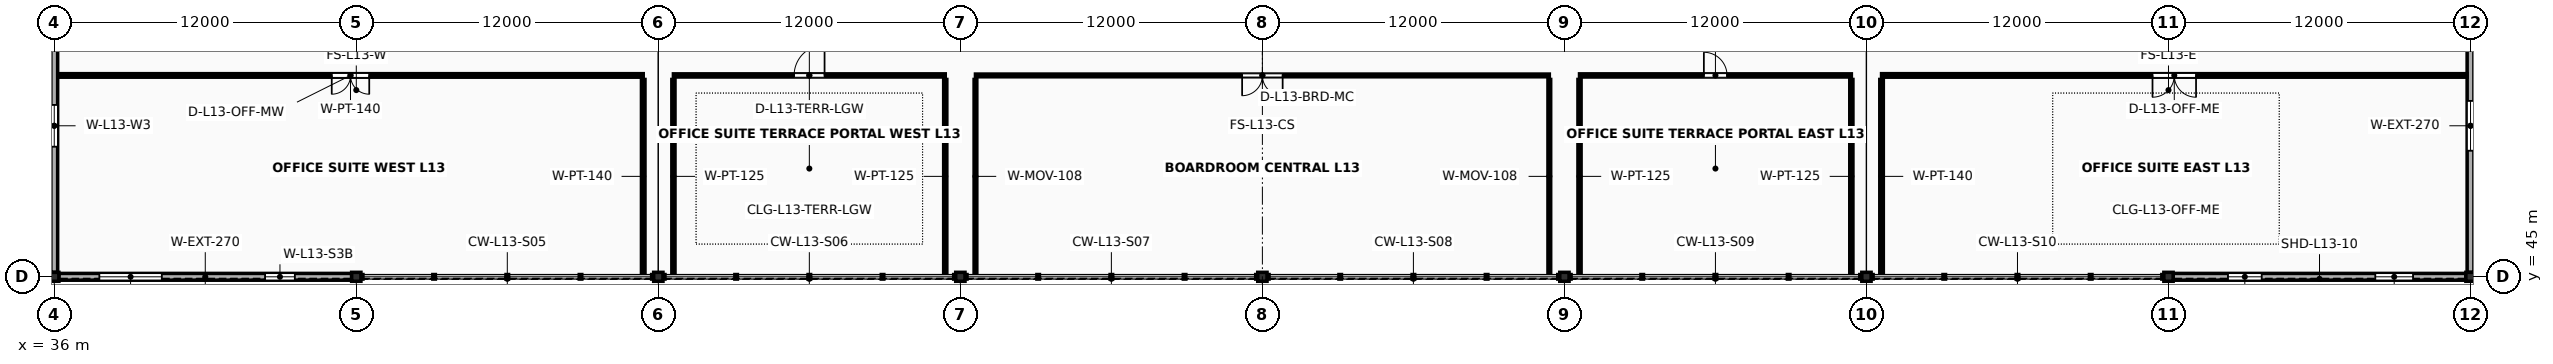
"""IFC4 building model, lengths in metres.
Left out: names, types, materials, properties, quantities, classifications, styles, units other than length and angle.
Written with IfcOpenShell. Run it as: python <this file> out.ifc"""

import sys

from ifc_helpers import new_model, si_unit, direction, frame, frame_2d, origin, origin_2d, place, context, subcontext, project, spatial, rectangle, i_section, extrude, element, fill, save


model = new_model("IFC4")
c1 = context("Model", 3, precision=1e-05, world=origin(), true_north=direction((0.0, 1.0)))
c2 = subcontext(c1, "Body", "Model", "MODEL_VIEW")
j1 = project(units=[si_unit("LENGTHUNIT", "METRE"), si_unit("PLANEANGLEUNIT", "RADIAN")], contexts=[c1])
p1 = place(None, origin())
s1 = spatial("IfcSite", under=j1, at=p1, CompositionType="ELEMENT")
p2 = place(p1, origin())
s2 = spatial("IfcBuilding", under=s1, at=p2, CompositionType="ELEMENT")
p3 = place(p2, frame((0.0, 0.0, 53.6)))
s3 = spatial("IfcBuildingStorey", under=s2, at=p3, CompositionType="ELEMENT", Elevation=53.6)
for number, where, z_axis, x_axis in (
    (1, (36.0, 45.0, 0.0), (0.0, 0.0, 1.0), (1.0, 0.0, 0.0)),
    (2, (48.0, 45.0, 0.0), (0.0, 0.0, 1.0), (1.0, 0.0, 0.0)),
    (3, (60.0, 45.0, 0.0), (0.0, 0.0, 1.0), (1.0, 0.0, 0.0)),
    (4, (72.0, 45.0, 0.0), (0.0, 0.0, 1.0), (1.0, 0.0, 0.0)),
    (5, (84.0, 45.0, 0.0), (0.0, 0.0, 1.0), (1.0, 0.0, 0.0)),
    (6, (96.0, 45.0, 0.0), (0.0, 0.0, 1.0), (1.0, 0.0, 0.0)),
    (7, (108.0, 45.0, 0.0), (0.0, 0.0, 1.0), (1.0, 0.0, 0.0)),
    (8, (120.0, 45.0, 0.0), (0.0, 0.0, 1.0), (1.0, 0.0, 0.0)),
    (9, (132.0, 45.0, 0.0), (0.0, 0.0, 1.0), (1.0, 0.0, 0.0)),
):
    element("IfcColumn", number, at=place(p3, frame(where, z_axis=z_axis, x_axis=x_axis)), inside=s3, PredefinedType="COLUMN", context=c2, shape_type="SweptSolid", body=[
        extrude(i_section(OverallWidth=0.369, OverallDepth=0.356, WebThickness=0.011, FlangeThickness=0.018, FilletRadius=0.018, at=origin_2d()), origin(), (0.0, 0.0, 1.0), 4.0),
    ])
p4 = place(p3, frame((36.183, 45.0, 0.0), z_axis=(0.0, 0.0, 1.0), x_axis=(1.0, 0.0, 0.0)))
e10 = element("IfcWall", 10, at=p4, inside=s3, PredefinedType="SOLIDWALL", context=c2, shape_type="SweptSolid", body=[
    extrude(rectangle(XDim=11.635, YDim=0.27, at=frame_2d((5.817, 0.0))), origin(), (0.0, 0.0, 1.0), 3.271),
])
p5 = place(p4, frame((1.61, 0.0, 0.78)))
e11 = element("IfcOpeningElement", 11, at=p5, cuts=e10, PredefinedType="OPENING", context=c2, shape_type="SweptSolid", body=[
    extrude(rectangle(XDim=2.48, YDim=1.42, at=frame_2d((1.24, 0.71))), frame((0.0, 0.15, 0.0), z_axis=(0.0, -1.0, 0.0), x_axis=(1.0, 0.0, 0.0)), (0.0, 0.0, 1.0), 0.3),
])
p6 = place(p4, frame((8.195, 0.0, 0.78)))
e12 = element("IfcOpeningElement", 12, at=p6, cuts=e10, PredefinedType="OPENING", context=c2, shape_type="SweptSolid", body=[
    extrude(rectangle(XDim=1.18, YDim=1.58, at=frame_2d((0.59, 0.79))), frame((0.0, 0.15, 0.0), z_axis=(0.0, -1.0, 0.0), x_axis=(1.0, 0.0, 0.0)), (0.0, 0.0, 1.0), 0.3),
])
p7 = place(p3, frame((120.183, 45.0, 0.0), z_axis=(0.0, 0.0, 1.0), x_axis=(1.0, 0.0, 0.0)))
e13 = element("IfcWall", 13, at=p7, inside=s3, PredefinedType="SOLIDWALL", context=c2, shape_type="SweptSolid", body=[
    extrude(rectangle(XDim=11.635, YDim=0.27, at=frame_2d((5.817, 0.0))), origin(), (0.0, 0.0, 1.0), 3.271),
])
p8 = place(p7, frame((2.18, 0.0, 0.78)))
e14 = element("IfcOpeningElement", 14, at=p8, cuts=e13, PredefinedType="OPENING", context=c2, shape_type="SweptSolid", body=[
    extrude(rectangle(XDim=1.34, YDim=1.58, at=frame_2d((0.67, 0.79))), frame((0.0, 0.15, 0.0), z_axis=(0.0, -1.0, 0.0), x_axis=(1.0, 0.0, 0.0)), (0.0, 0.0, 1.0), 0.3),
])
p9 = place(p7, frame((8.035, 0.0, 0.78)))
e15 = element("IfcOpeningElement", 15, at=p9, cuts=e13, PredefinedType="OPENING", context=c2, shape_type="SweptSolid", body=[
    extrude(rectangle(XDim=1.5, YDim=1.58, at=frame_2d((0.75, 0.79))), frame((0.0, 0.15, 0.0), z_axis=(0.0, -1.0, 0.0), x_axis=(1.0, 0.0, 0.0)), (0.0, 0.0, 1.0), 0.3),
])
p10 = place(p3, frame((36.0, 45.176, 0.0), z_axis=(0.0, 0.0, 1.0), x_axis=(0.0, 1.0, 0.0)))
e16 = element("IfcWall", 16, at=p10, inside=s3, PredefinedType="SOLIDWALL", context=c2, shape_type="SweptSolid", body=[
    extrude(rectangle(XDim=11.648, YDim=0.27, at=frame_2d((5.824, 0.0))), origin(), (0.0, 0.0, 1.0), 3.271),
])
p11 = place(p10, frame((4.994, 0.0, 0.78)))
e17 = element("IfcOpeningElement", 17, at=p11, cuts=e16, PredefinedType="OPENING", context=c2, shape_type="SweptSolid", body=[
    extrude(rectangle(XDim=1.66, YDim=1.58, at=frame_2d((0.83, 0.79))), frame((0.0, 0.15, 0.0), z_axis=(0.0, -1.0, 0.0), x_axis=(1.0, 0.0, 0.0)), (0.0, 0.0, 1.0), 0.3),
])
p12 = place(p3, frame((132.0, 45.176, 0.0), z_axis=(0.0, 0.0, 1.0), x_axis=(0.0, 1.0, 0.0)))
e18 = element("IfcWall", 18, at=p12, inside=s3, PredefinedType="SOLIDWALL", context=c2, shape_type="SweptSolid", body=[
    extrude(rectangle(XDim=11.648, YDim=0.27, at=frame_2d((5.824, 0.0))), origin(), (0.0, 0.0, 1.0), 3.271),
])
p13 = place(p12, frame((4.834, 0.0, 0.78)))
e19 = element("IfcOpeningElement", 19, at=p13, cuts=e18, PredefinedType="OPENING", context=c2, shape_type="SweptSolid", body=[
    extrude(rectangle(XDim=1.98, YDim=1.58, at=frame_2d((0.99, 0.79))), frame((0.0, 0.15, 0.0), z_axis=(0.0, -1.0, 0.0), x_axis=(1.0, 0.0, 0.0)), (0.0, 0.0, 1.0), 0.3),
])
p14 = place(p3, frame((36.14, 53.0, 0.0), z_axis=(0.0, 0.0, 1.0), x_axis=(1.0, 0.0, 0.0)))
e20 = element("IfcWall", 20, at=p14, inside=s3, PredefinedType="PARTITIONING", context=c2, shape_type="SweptSolid", body=[
    extrude(rectangle(XDim=23.26, YDim=0.14, at=frame_2d((11.63, 0.0))), origin(), (0.0, 0.0, 1.0), 2.88),
])
p15 = place(p14, frame((10.885, 0.0, 0.0)))
e21 = element("IfcOpeningElement", 21, at=p15, cuts=e20, PredefinedType="OPENING", context=c2, shape_type="SweptSolid", body=[
    extrude(rectangle(XDim=1.49, YDim=2.28, at=frame_2d((0.745, 1.14))), frame((0.0, 0.085, 0.0), z_axis=(0.0, -1.0, 0.0), x_axis=(1.0, 0.0, 0.0)), (0.0, 0.0, 1.0), 0.17),
])
p16 = place(p3, frame((59.4, 45.14, 0.0), z_axis=(0.0, 0.0, 1.0), x_axis=(0.0, 1.0, 0.0)))
e22 = element("IfcWall", 22, at=p16, inside=s3, PredefinedType="PARTITIONING", context=c2, shape_type="SweptSolid", body=[
    extrude(rectangle(XDim=7.7, YDim=0.14, at=frame_2d((3.85, 0.0))), origin(), (0.0, 0.0, 1.0), 2.88),
])
p17 = place(p3, frame((60.6, 53.0, 0.0), z_axis=(0.0, 0.0, 1.0), x_axis=(1.0, 0.0, 0.0)))
e23 = element("IfcWall", 23, at=p17, inside=s3, PredefinedType="PARTITIONING", context=c2, shape_type="SweptSolid", body=[
    extrude(rectangle(XDim=10.8, YDim=0.125, at=frame_2d((5.4, 0.0))), origin(), (0.0, 0.0, 1.0), 2.88),
])
p18 = place(p17, frame((4.795, 0.0, 0.0)))
e24 = element("IfcOpeningElement", 24, at=p18, cuts=e23, PredefinedType="OPENING", context=c2, shape_type="SweptSolid", body=[
    extrude(rectangle(XDim=1.21, YDim=2.25, at=frame_2d((0.605, 1.125))), frame((0.0, 0.077, 0.0), z_axis=(0.0, -1.0, 0.0), x_axis=(1.0, 0.0, 0.0)), (0.0, 0.0, 1.0), 0.155),
])
for number, where, z_axis, x_axis in (
    (25, (60.6, 45.14, 0.0), (0.0, 0.0, 1.0), (0.0, 1.0, 0.0)),
    (26, (71.4, 45.14, 0.0), (0.0, 0.0, 1.0), (0.0, 1.0, 0.0)),
):
    element("IfcWall", number, at=place(p3, frame(where, z_axis=z_axis, x_axis=x_axis)), inside=s3, PredefinedType="PARTITIONING", context=c2, shape_type="SweptSolid", body=[
        extrude(rectangle(XDim=7.7, YDim=0.125, at=frame_2d((3.85, 0.0))), origin(), (0.0, 0.0, 1.0), 2.88),
    ])
p19 = place(p3, frame((72.6, 53.0, 0.0), z_axis=(0.0, 0.0, 1.0), x_axis=(1.0, 0.0, 0.0)))
e27 = element("IfcWall", 27, at=p19, inside=s3, PredefinedType="MOVABLE", context=c2, shape_type="SweptSolid", body=[
    extrude(rectangle(XDim=22.8, YDim=0.108, at=frame_2d((11.4, 0.0))), origin(), (0.0, 0.0, 1.0), 2.88),
])
p20 = place(p19, frame((10.595, 0.0, 0.0)))
e28 = element("IfcOpeningElement", 28, at=p20, cuts=e27, PredefinedType="OPENING", context=c2, shape_type="SweptSolid", body=[
    extrude(rectangle(XDim=1.61, YDim=2.33, at=frame_2d((0.805, 1.165))), frame((0.0, 0.069, 0.0), z_axis=(0.0, -1.0, 0.0), x_axis=(1.0, 0.0, 0.0)), (0.0, 0.0, 1.0), 0.138),
])
for number, where, z_axis, x_axis in (
    (29, (72.6, 45.14, 0.0), (0.0, 0.0, 1.0), (0.0, 1.0, 0.0)),
    (30, (95.4, 45.14, 0.0), (0.0, 0.0, 1.0), (0.0, 1.0, 0.0)),
):
    element("IfcWall", number, at=place(p3, frame(where, z_axis=z_axis, x_axis=x_axis)), inside=s3, PredefinedType="MOVABLE", context=c2, shape_type="SweptSolid", body=[
        extrude(rectangle(XDim=7.7, YDim=0.108, at=frame_2d((3.85, 0.0))), origin(), (0.0, 0.0, 1.0), 2.88),
    ])
p21 = place(p3, frame((96.6, 53.0, 0.0), z_axis=(0.0, 0.0, 1.0), x_axis=(1.0, 0.0, 0.0)))
e31 = element("IfcWall", 31, at=p21, inside=s3, PredefinedType="PARTITIONING", context=c2, shape_type="SweptSolid", body=[
    extrude(rectangle(XDim=10.8, YDim=0.125, at=frame_2d((5.4, 0.0))), origin(), (0.0, 0.0, 1.0), 2.88),
])
p22 = place(p21, frame((4.94, 0.0, 0.0)))
e32 = element("IfcOpeningElement", 32, at=p22, cuts=e31, PredefinedType="OPENING", context=c2, shape_type="SweptSolid", body=[
    extrude(rectangle(XDim=0.92, YDim=2.1, at=frame_2d((0.46, 1.05))), frame((0.0, 0.077, 0.0), z_axis=(0.0, -1.0, 0.0), x_axis=(1.0, 0.0, 0.0)), (0.0, 0.0, 1.0), 0.155),
])
for number, where, z_axis, x_axis in (
    (33, (96.6, 45.14, 0.0), (0.0, 0.0, 1.0), (0.0, 1.0, 0.0)),
    (34, (107.4, 45.14, 0.0), (0.0, 0.0, 1.0), (0.0, 1.0, 0.0)),
):
    element("IfcWall", number, at=place(p3, frame(where, z_axis=z_axis, x_axis=x_axis)), inside=s3, PredefinedType="PARTITIONING", context=c2, shape_type="SweptSolid", body=[
        extrude(rectangle(XDim=7.7, YDim=0.125, at=frame_2d((3.85, 0.0))), origin(), (0.0, 0.0, 1.0), 2.88),
    ])
p23 = place(p3, frame((108.6, 53.0, 0.0), z_axis=(0.0, 0.0, 1.0), x_axis=(1.0, 0.0, 0.0)))
e35 = element("IfcWall", 35, at=p23, inside=s3, PredefinedType="PARTITIONING", context=c2, shape_type="SweptSolid", body=[
    extrude(rectangle(XDim=23.26, YDim=0.14, at=frame_2d((11.63, 0.0))), origin(), (0.0, 0.0, 1.0), 2.88),
])
p24 = place(p23, frame((10.765, 0.0, 0.0)))
e36 = element("IfcOpeningElement", 36, at=p24, cuts=e35, PredefinedType="OPENING", context=c2, shape_type="SweptSolid", body=[
    extrude(rectangle(XDim=1.73, YDim=2.37, at=frame_2d((0.865, 1.185))), frame((0.0, 0.085, 0.0), z_axis=(0.0, -1.0, 0.0), x_axis=(1.0, 0.0, 0.0)), (0.0, 0.0, 1.0), 0.17),
])
p25 = place(p3, frame((108.6, 45.14, 0.0), z_axis=(0.0, 0.0, 1.0), x_axis=(0.0, 1.0, 0.0)))
e37 = element("IfcWall", 37, at=p25, inside=s3, PredefinedType="PARTITIONING", context=c2, shape_type="SweptSolid", body=[
    extrude(rectangle(XDim=7.7, YDim=0.14, at=frame_2d((3.85, 0.0))), origin(), (0.0, 0.0, 1.0), 2.88),
])
p26 = place(p5, origin())
e38 = element("IfcWindow", 38, at=p26, inside=s3, PartitioningType="DOUBLE_PANEL_VERTICAL", PredefinedType="WINDOW", context=c2, shape_type="SweptSolid", body=[
    extrude(rectangle(XDim=2.48, YDim=1.42, at=frame_2d((1.24, 0.71))), frame((0.0, 0.03, 0.0), z_axis=(0.0, -1.0, 0.0), x_axis=(1.0, 0.0, 0.0)), (0.0, 0.0, 1.0), 0.06),
])
fill(e11, e38)
p27 = place(p6, origin())
e39 = element("IfcWindow", 39, at=p27, inside=s3, PartitioningType="SINGLE_PANEL", PredefinedType="WINDOW", context=c2, shape_type="SweptSolid", body=[
    extrude(rectangle(XDim=1.18, YDim=1.58, at=frame_2d((0.59, 0.79))), frame((0.0, 0.03, 0.0), z_axis=(0.0, -1.0, 0.0), x_axis=(1.0, 0.0, 0.0)), (0.0, 0.0, 1.0), 0.06),
])
fill(e12, e39)
p28 = place(p8, origin())
e40 = element("IfcWindow", 40, at=p28, inside=s3, PartitioningType="SINGLE_PANEL", PredefinedType="WINDOW", context=c2, shape_type="SweptSolid", body=[
    extrude(rectangle(XDim=1.34, YDim=1.58, at=frame_2d((0.67, 0.79))), frame((0.0, 0.03, 0.0), z_axis=(0.0, -1.0, 0.0), x_axis=(1.0, 0.0, 0.0)), (0.0, 0.0, 1.0), 0.06),
])
fill(e14, e40)
p29 = place(p9, origin())
e41 = element("IfcWindow", 41, at=p29, inside=s3, PartitioningType="SINGLE_PANEL", PredefinedType="WINDOW", context=c2, shape_type="SweptSolid", body=[
    extrude(rectangle(XDim=1.5, YDim=1.58, at=frame_2d((0.75, 0.79))), frame((0.0, 0.03, 0.0), z_axis=(0.0, -1.0, 0.0), x_axis=(1.0, 0.0, 0.0)), (0.0, 0.0, 1.0), 0.06),
])
fill(e15, e41)
p30 = place(p11, origin())
e42 = element("IfcWindow", 42, at=p30, inside=s3, PartitioningType="SINGLE_PANEL", PredefinedType="WINDOW", context=c2, shape_type="SweptSolid", body=[
    extrude(rectangle(XDim=1.66, YDim=1.58, at=frame_2d((0.83, 0.79))), frame((0.0, 0.03, 0.0), z_axis=(0.0, -1.0, 0.0), x_axis=(1.0, 0.0, 0.0)), (0.0, 0.0, 1.0), 0.06),
])
fill(e17, e42)
p31 = place(p13, origin())
e43 = element("IfcWindow", 43, at=p31, inside=s3, PartitioningType="DOUBLE_PANEL_VERTICAL", PredefinedType="WINDOW", context=c2, shape_type="SweptSolid", body=[
    extrude(rectangle(XDim=1.98, YDim=1.58, at=frame_2d((0.99, 0.79))), frame((0.0, 0.03, 0.0), z_axis=(0.0, -1.0, 0.0), x_axis=(1.0, 0.0, 0.0)), (0.0, 0.0, 1.0), 0.06),
])
fill(e19, e43)
p32 = place(p15, origin())
e44 = element("IfcDoor", 44, at=p32, inside=s3, OperationType="DOUBLE_DOOR_SINGLE_SWING", PredefinedType="DOOR", context=c2, shape_type="SweptSolid", body=[
    extrude(rectangle(XDim=1.49, YDim=2.28, at=frame_2d((0.745, 1.14))), frame((0.0, 0.025, 0.0), z_axis=(0.0, -1.0, 0.0), x_axis=(1.0, 0.0, 0.0)), (0.0, 0.0, 1.0), 0.05),
])
fill(e21, e44)
p33 = place(p18, origin())
e45 = element("IfcDoor", 45, at=p33, inside=s3, OperationType="SINGLE_SWING_RIGHT", PredefinedType="DOOR", context=c2, shape_type="SweptSolid", body=[
    extrude(rectangle(XDim=1.21, YDim=2.25, at=frame_2d((0.605, 1.125))), frame((0.0, 0.025, 0.0), z_axis=(0.0, -1.0, 0.0), x_axis=(1.0, 0.0, 0.0)), (0.0, 0.0, 1.0), 0.05),
])
fill(e24, e45)
p34 = place(p20, origin())
e46 = element("IfcDoor", 46, at=p34, inside=s3, OperationType="DOUBLE_DOOR_SINGLE_SWING", PredefinedType="DOOR", context=c2, shape_type="SweptSolid", body=[
    extrude(rectangle(XDim=1.61, YDim=2.33, at=frame_2d((0.805, 1.165))), frame((0.0, 0.025, 0.0), z_axis=(0.0, -1.0, 0.0), x_axis=(1.0, 0.0, 0.0)), (0.0, 0.0, 1.0), 0.05),
])
fill(e28, e46)
p35 = place(p22, origin())
e47 = element("IfcDoor", 47, at=p35, inside=s3, OperationType="SINGLE_SWING_LEFT", PredefinedType="DOOR", context=c2, shape_type="SweptSolid", body=[
    extrude(rectangle(XDim=0.92, YDim=2.1, at=frame_2d((0.46, 1.05))), frame((0.0, 0.025, 0.0), z_axis=(0.0, -1.0, 0.0), x_axis=(1.0, 0.0, 0.0)), (0.0, 0.0, 1.0), 0.05),
])
fill(e32, e47)
p36 = place(p24, origin())
e48 = element("IfcDoor", 48, at=p36, inside=s3, OperationType="DOUBLE_DOOR_SINGLE_SWING", PredefinedType="DOOR", context=c2, shape_type="SweptSolid", body=[
    extrude(rectangle(XDim=1.73, YDim=2.37, at=frame_2d((0.865, 1.185))), frame((0.0, 0.025, 0.0), z_axis=(0.0, -1.0, 0.0), x_axis=(1.0, 0.0, 0.0)), (0.0, 0.0, 1.0), 0.05),
])
fill(e36, e48)
save(model, sys.argv[1])
